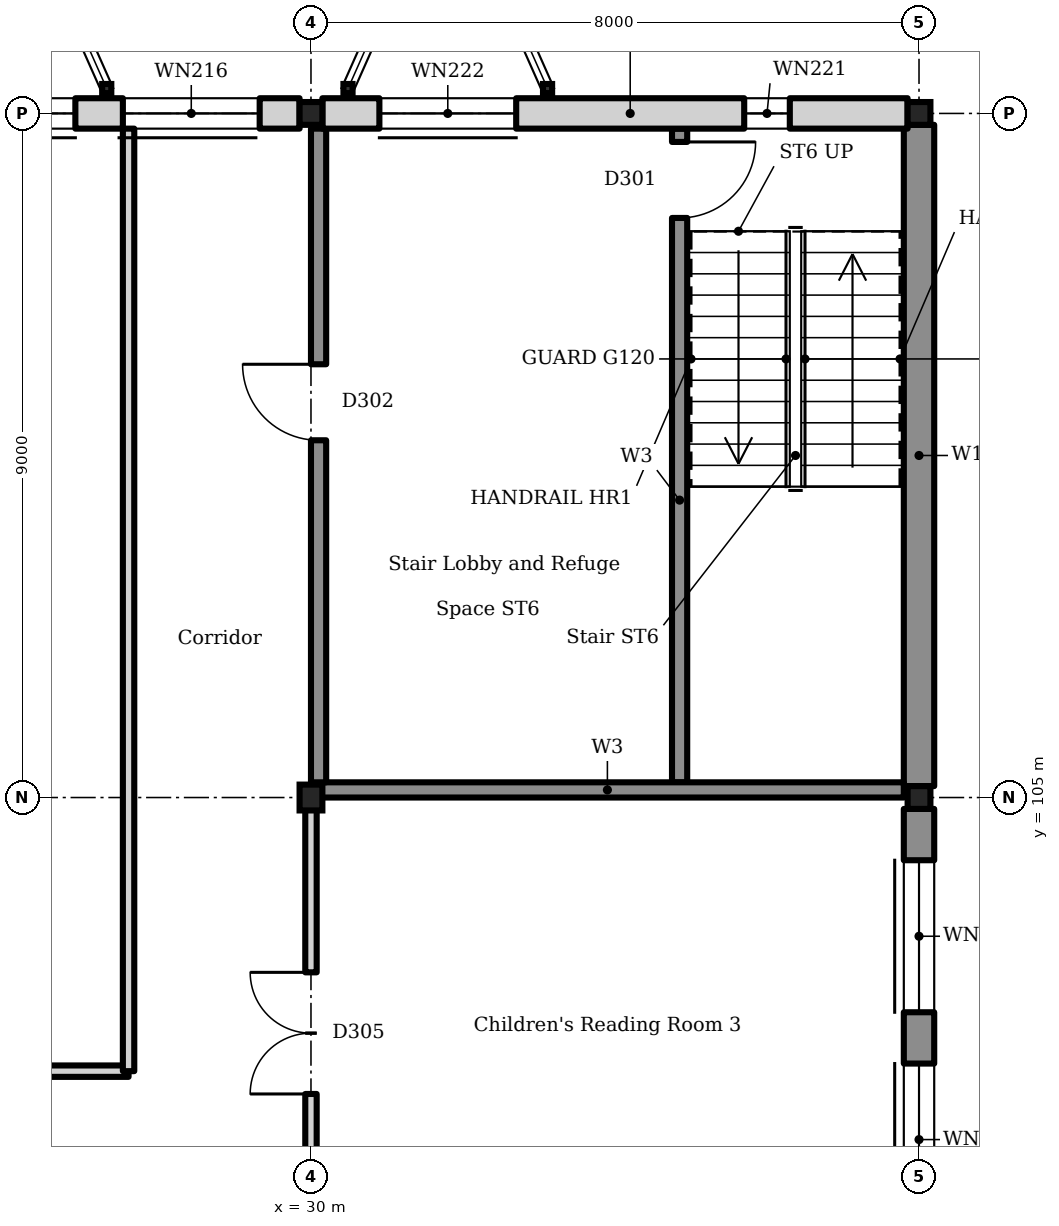
"""IFC4 building model, lengths in metres.
Left out: names, types, materials, properties, quantities, classifications, styles, units other than length and angle.
Written with IfcOpenShell. Run it as: python <this file> out.ifc"""

import sys

from ifc_helpers import new_model, si_unit, direction, frame, frame_2d, origin, origin_2d, place, context, subcontext, project, spatial, rectangle, i_section, extrude, element, fill, save


model = new_model("IFC4")
c1 = context("Model", 3, precision=1e-05, world=origin(), true_north=direction((0.0, 1.0)))
c2 = subcontext(c1, "Body", "Model", "MODEL_VIEW")
j1 = project(units=[si_unit("LENGTHUNIT", "METRE"), si_unit("PLANEANGLEUNIT", "RADIAN")], contexts=[c1])
p1 = place(None, origin())
s1 = spatial("IfcSite", under=j1, at=p1, CompositionType="ELEMENT")
p2 = place(p1, origin())
s2 = spatial("IfcBuilding", under=s1, at=p2, CompositionType="ELEMENT")
p3 = place(p2, frame((0.0, 0.0, 5.4)))
s3 = spatial("IfcBuildingStorey", under=s2, at=p3, CompositionType="ELEMENT", Elevation=5.4)
p4 = place(p3, frame((30.0, 105.0, 0.0), z_axis=(0.0, 0.0, 1.0), x_axis=(1.0, 0.0, 0.0)))
e1 = element("IfcColumn", 1, at=p4, inside=s3, PredefinedType="COLUMN", context=c2, shape_type="SweptSolid", body=[
    extrude(i_section(OverallWidth=0.3, OverallDepth=0.34, WebThickness=0.012, FlangeThickness=0.021, FilletRadius=0.027, at=origin_2d()), origin(), (0.0, 0.0, 1.0), 4.5),
])
for number, where, z_axis, x_axis in (
    (2, (30.0, 114.0, 0.0), (0.0, 0.0, 1.0), (1.0, 0.0, 0.0)),
    (3, (38.0, 105.0, 0.0), (0.0, 0.0, 1.0), (1.0, 0.0, 0.0)),
    (4, (38.0, 114.0, 0.0), (0.0, 0.0, 1.0), (1.0, 0.0, 0.0)),
):
    element("IfcColumn", number, at=place(p3, frame(where, z_axis=z_axis, x_axis=x_axis)), inside=s3, PredefinedType="COLUMN", context=c2, shape_type="SweptSolid", body=[
        extrude(i_section(OverallWidth=0.3, OverallDepth=0.3, WebThickness=0.011, FlangeThickness=0.019, FilletRadius=0.027, at=origin_2d()), origin(), (0.0, 0.0, 1.0), 4.5),
    ])
p5 = place(p3, frame((22.15, 114.0, 0.0), z_axis=(0.0, 0.0, 1.0), x_axis=(1.0, 0.0, 0.0)))
e5 = element("IfcWall", 5, at=p5, inside=s3, PredefinedType="SOLIDWALL", context=c2, shape_type="SweptSolid", body=[
    extrude(rectangle(XDim=7.7, YDim=0.4, at=frame_2d((3.85, 0.0))), origin(), (0.0, 0.0, 1.0), 3.93),
])
p6 = place(p5, frame((0.575, 0.0, 0.45)))
e6 = element("IfcOpeningElement", 6, at=p6, cuts=e5, PredefinedType="OPENING", context=c2, shape_type="SweptSolid", body=[
    extrude(rectangle(XDim=1.8, YDim=3.0, at=frame_2d((0.9, 1.5))), frame((0.0, 0.21, 0.0), z_axis=(0.0, -1.0, 0.0), x_axis=(1.0, 0.0, 0.0)), (0.0, 0.0, 1.0), 0.42),
])
p7 = place(p5, frame((2.95, 0.0, 0.45)))
e7 = element("IfcOpeningElement", 7, at=p7, cuts=e5, PredefinedType="OPENING", context=c2, shape_type="SweptSolid", body=[
    extrude(rectangle(XDim=1.8, YDim=3.0, at=frame_2d((0.9, 1.5))), frame((0.0, 0.21, 0.0), z_axis=(0.0, -1.0, 0.0), x_axis=(1.0, 0.0, 0.0)), (0.0, 0.0, 1.0), 0.42),
])
p8 = place(p5, frame((5.375, 0.0, 0.45)))
e8 = element("IfcOpeningElement", 8, at=p8, cuts=e5, PredefinedType="OPENING", context=c2, shape_type="SweptSolid", body=[
    extrude(rectangle(XDim=1.8, YDim=3.0, at=frame_2d((0.9, 1.5))), frame((0.0, 0.21, 0.0), z_axis=(0.0, -1.0, 0.0), x_axis=(1.0, 0.0, 0.0)), (0.0, 0.0, 1.0), 0.42),
])
p9 = place(p3, frame((30.15, 114.0, 0.0), z_axis=(0.0, 0.0, 1.0), x_axis=(1.0, 0.0, 0.0)))
e9 = element("IfcWall", 9, at=p9, inside=s3, PredefinedType="SOLIDWALL", context=c2, shape_type="SweptSolid", body=[
    extrude(rectangle(XDim=7.7, YDim=0.4, at=frame_2d((3.85, 0.0))), origin(), (0.0, 0.0, 1.0), 3.93),
])
p10 = place(p9, frame((5.55, 0.0, 1.0)))
e10 = element("IfcOpeningElement", 10, at=p10, cuts=e9, PredefinedType="OPENING", context=c2, shape_type="SweptSolid", body=[
    extrude(rectangle(XDim=0.6, YDim=2.4, at=frame_2d((0.3, 1.2))), frame((0.0, 0.21, 0.0), z_axis=(0.0, -1.0, 0.0), x_axis=(1.0, 0.0, 0.0)), (0.0, 0.0, 1.0), 0.42),
])
p11 = place(p9, frame((0.75, 0.0, 0.45)))
e11 = element("IfcOpeningElement", 11, at=p11, cuts=e9, PredefinedType="OPENING", context=c2, shape_type="SweptSolid", body=[
    extrude(rectangle(XDim=1.8, YDim=3.0, at=frame_2d((0.9, 1.5))), frame((0.0, 0.21, 0.0), z_axis=(0.0, -1.0, 0.0), x_axis=(1.0, 0.0, 0.0)), (0.0, 0.0, 1.0), 0.42),
])
p12 = place(p3, frame((38.0, 96.15, 0.0), z_axis=(0.0, 0.0, 1.0), x_axis=(0.0, 1.0, 0.0)))
e12 = element("IfcWall", 12, at=p12, inside=s3, PredefinedType="SOLIDWALL", context=c2, shape_type="SweptSolid", body=[
    extrude(rectangle(XDim=8.7, YDim=0.4, at=frame_2d((4.35, 0.0))), origin(), (0.0, 0.0, 1.0), 4.5),
])
p13 = place(p12, frame((0.675, 0.0, 0.45)))
e13 = element("IfcOpeningElement", 13, at=p13, cuts=e12, PredefinedType="OPENING", context=c2, shape_type="SweptSolid", body=[
    extrude(rectangle(XDim=2.0, YDim=3.0, at=frame_2d((1.0, 1.5))), frame((0.0, 0.21, 0.0), z_axis=(0.0, -1.0, 0.0), x_axis=(1.0, 0.0, 0.0)), (0.0, 0.0, 1.0), 0.42),
])
p14 = place(p12, frame((3.35, 0.0, 0.45)))
e14 = element("IfcOpeningElement", 14, at=p14, cuts=e12, PredefinedType="OPENING", context=c2, shape_type="SweptSolid", body=[
    extrude(rectangle(XDim=2.0, YDim=3.0, at=frame_2d((1.0, 1.5))), frame((0.0, 0.21, 0.0), z_axis=(0.0, -1.0, 0.0), x_axis=(1.0, 0.0, 0.0)), (0.0, 0.0, 1.0), 0.42),
])
p15 = place(p12, frame((6.025, 0.0, 0.45)))
e15 = element("IfcOpeningElement", 15, at=p15, cuts=e12, PredefinedType="OPENING", context=c2, shape_type="SweptSolid", body=[
    extrude(rectangle(XDim=2.0, YDim=3.0, at=frame_2d((1.0, 1.5))), frame((0.0, 0.21, 0.0), z_axis=(0.0, -1.0, 0.0), x_axis=(1.0, 0.0, 0.0)), (0.0, 0.0, 1.0), 0.42),
])
p16 = place(p3, frame((38.0, 105.15, 0.0), z_axis=(0.0, 0.0, 1.0), x_axis=(0.0, 1.0, 0.0)))
e16 = element("IfcWall", 16, at=p16, inside=s3, PredefinedType="SOLIDWALL", context=c2, shape_type="SweptSolid", body=[
    extrude(rectangle(XDim=8.7, YDim=0.4, at=frame_2d((4.35, 0.0))), origin(), (0.0, 0.0, 1.0), 4.5),
])
p17 = place(p3, frame((34.85, 105.2, 0.0), z_axis=(0.0, 0.0, 1.0), x_axis=(0.0, 1.0, 0.0)))
e17 = element("IfcWall", 17, at=p17, inside=s3, PredefinedType="SOLIDWALL", context=c2, shape_type="SweptSolid", body=[
    extrude(rectangle(XDim=8.6, YDim=0.2, at=frame_2d((4.3, 0.0))), origin(), (0.0, 0.0, 1.0), 4.35),
])
p18 = place(p17, frame((7.425, 0.0, 0.0)))
e18 = element("IfcOpeningElement", 18, at=p18, cuts=e17, PredefinedType="OPENING", context=c2, shape_type="SweptSolid", body=[
    extrude(rectangle(XDim=1.0, YDim=2.1, at=frame_2d((0.5, 1.05))), frame((0.0, 0.11, 0.0), z_axis=(0.0, -1.0, 0.0), x_axis=(1.0, 0.0, 0.0)), (0.0, 0.0, 1.0), 0.22),
])
p19 = place(p3, frame((30.0, 105.1, 0.0), z_axis=(0.0, 0.0, 1.0), x_axis=(1.0, 0.0, 0.0)))
e19 = element("IfcWall", 19, at=p19, inside=s3, PredefinedType="SOLIDWALL", context=c2, shape_type="SweptSolid", body=[
    extrude(rectangle(XDim=7.8, YDim=0.2, at=frame_2d((3.9, 0.0))), origin(), (0.0, 0.0, 1.0), 4.35),
])
p20 = place(p3, frame((30.1, 105.2, 0.0), z_axis=(0.0, 0.0, 1.0), x_axis=(0.0, 1.0, 0.0)))
e20 = element("IfcWall", 20, at=p20, inside=s3, PredefinedType="SOLIDWALL", context=c2, shape_type="SweptSolid", body=[
    extrude(rectangle(XDim=8.6, YDim=0.2, at=frame_2d((4.3, 0.0))), origin(), (0.0, 0.0, 1.0), 3.91),
])
p21 = place(p20, frame((4.5, 0.0, 0.0)))
e21 = element("IfcOpeningElement", 21, at=p21, cuts=e20, PredefinedType="OPENING", context=c2, shape_type="SweptSolid", body=[
    extrude(rectangle(XDim=1.0, YDim=2.1, at=frame_2d((0.5, 1.05))), frame((0.0, 0.11, 0.0), z_axis=(0.0, -1.0, 0.0), x_axis=(1.0, 0.0, 0.0)), (0.0, 0.0, 1.0), 0.22),
])
p22 = place(p3, frame((10.4, 101.4, 0.0), z_axis=(0.0, 0.0, 1.0), x_axis=(1.0, 0.0, 0.0)))
e22 = element("IfcWall", 22, at=p22, inside=s3, PredefinedType="PARTITIONING", context=c2, shape_type="SweptSolid", body=[
    extrude(rectangle(XDim=17.2, YDim=0.15, at=frame_2d((8.6, 0.0))), origin(), (0.0, 0.0, 1.0), 3.91),
])
p23 = place(p22, frame((8.11, 0.0, 0.0)))
e23 = element("IfcOpeningElement", 23, at=p23, cuts=e22, PredefinedType="OPENING", context=c2, shape_type="SweptSolid", body=[
    extrude(rectangle(XDim=1.0, YDim=2.1, at=frame_2d((0.5, 1.05))), frame((0.0, 0.085, 0.0), z_axis=(0.0, -1.0, 0.0), x_axis=(1.0, 0.0, 0.0)), (0.0, 0.0, 1.0), 0.17),
])
p24 = place(p3, frame((27.6, 101.4, 0.0), z_axis=(0.0, 0.0, 1.0), x_axis=(0.0, 1.0, 0.0)))
e24 = element("IfcWall", 24, at=p24, inside=s3, PredefinedType="PARTITIONING", context=c2, shape_type="SweptSolid", body=[
    extrude(rectangle(XDim=12.4, YDim=0.15, at=frame_2d((6.2, 0.0))), origin(), (0.0, 0.0, 1.0), 3.96),
])
p25 = place(p3, frame((30.0, 99.0, 0.0), z_axis=(0.0, 0.0, 1.0), x_axis=(0.0, 1.0, 0.0)))
e25 = element("IfcWall", 25, at=p25, inside=s3, PredefinedType="PARTITIONING", context=c2, shape_type="SweptSolid", body=[
    extrude(rectangle(XDim=5.85, YDim=0.15, at=frame_2d((2.925, 0.0))), origin(), (0.0, 0.0, 1.0), 3.91),
])
p26 = place(p25, frame((2.1, 0.0, 0.0)))
e26 = element("IfcOpeningElement", 26, at=p26, cuts=e25, PredefinedType="OPENING", context=c2, shape_type="SweptSolid", body=[
    extrude(rectangle(XDim=1.6, YDim=2.1, at=frame_2d((0.8, 1.05))), frame((0.0, 0.085, 0.0), z_axis=(0.0, -1.0, 0.0), x_axis=(1.0, 0.0, 0.0)), (0.0, 0.0, 1.0), 0.17),
])
p27 = place(p7, origin())
e27 = element("IfcWindow", 27, at=p27, inside=s3, PartitioningType="SINGLE_PANEL", PredefinedType="WINDOW", context=c2, shape_type="SweptSolid", body=[
    extrude(rectangle(XDim=1.8, YDim=3.0, at=frame_2d((0.9, 1.5))), frame((0.0, 0.03, 0.0), z_axis=(0.0, -1.0, 0.0), x_axis=(1.0, 0.0, 0.0)), (0.0, 0.0, 1.0), 0.06),
])
fill(e7, e27)
p28 = place(p8, origin())
e28 = element("IfcWindow", 28, at=p28, inside=s3, PartitioningType="SINGLE_PANEL", PredefinedType="WINDOW", context=c2, shape_type="SweptSolid", body=[
    extrude(rectangle(XDim=1.8, YDim=3.0, at=frame_2d((0.9, 1.5))), frame((0.0, 0.03, 0.0), z_axis=(0.0, -1.0, 0.0), x_axis=(1.0, 0.0, 0.0)), (0.0, 0.0, 1.0), 0.06),
])
fill(e8, e28)
p29 = place(p10, origin())
e29 = element("IfcWindow", 29, at=p29, inside=s3, PartitioningType="SINGLE_PANEL", PredefinedType="WINDOW", context=c2, shape_type="SweptSolid", body=[
    extrude(rectangle(XDim=0.6, YDim=2.4, at=frame_2d((0.3, 1.2))), frame((0.0, 0.03, 0.0), z_axis=(0.0, -1.0, 0.0), x_axis=(1.0, 0.0, 0.0)), (0.0, 0.0, 1.0), 0.06),
])
fill(e10, e29)
p30 = place(p11, origin())
e30 = element("IfcWindow", 30, at=p30, inside=s3, PartitioningType="SINGLE_PANEL", PredefinedType="WINDOW", context=c2, shape_type="SweptSolid", body=[
    extrude(rectangle(XDim=1.8, YDim=3.0, at=frame_2d((0.9, 1.5))), frame((0.0, 0.03, 0.0), z_axis=(0.0, -1.0, 0.0), x_axis=(1.0, 0.0, 0.0)), (0.0, 0.0, 1.0), 0.06),
])
fill(e11, e30)
p31 = place(p14, origin())
e31 = element("IfcWindow", 31, at=p31, inside=s3, PartitioningType="SINGLE_PANEL", PredefinedType="WINDOW", context=c2, shape_type="SweptSolid", body=[
    extrude(rectangle(XDim=2.0, YDim=3.0, at=frame_2d((1.0, 1.5))), frame((0.0, 0.03, 0.0), z_axis=(0.0, -1.0, 0.0), x_axis=(1.0, 0.0, 0.0)), (0.0, 0.0, 1.0), 0.06),
])
fill(e14, e31)
p32 = place(p15, origin())
e32 = element("IfcWindow", 32, at=p32, inside=s3, PartitioningType="SINGLE_PANEL", PredefinedType="WINDOW", context=c2, shape_type="SweptSolid", body=[
    extrude(rectangle(XDim=2.0, YDim=3.0, at=frame_2d((1.0, 1.5))), frame((0.0, 0.03, 0.0), z_axis=(0.0, -1.0, 0.0), x_axis=(1.0, 0.0, 0.0)), (0.0, 0.0, 1.0), 0.06),
])
fill(e15, e32)
p33 = place(p18, frame((1.0, 0.0, 0.0), z_axis=(0.0, 0.0, 1.0), x_axis=(-1.0, 0.0, 0.0)))
e33 = element("IfcDoor", 33, at=p33, inside=s3, OperationType="SINGLE_SWING_RIGHT", PredefinedType="DOOR", context=c2, shape_type="SweptSolid", body=[
    extrude(rectangle(XDim=1.0, YDim=2.1, at=frame_2d((0.5, 1.05))), frame((0.0, 0.025, 0.0), z_axis=(0.0, -1.0, 0.0), x_axis=(1.0, 0.0, 0.0)), (0.0, 0.0, 1.0), 0.05),
])
fill(e18, e33)
p34 = place(p21, origin())
e34 = element("IfcDoor", 34, at=p34, inside=s3, OperationType="SINGLE_SWING_LEFT", PredefinedType="DOOR", context=c2, shape_type="SweptSolid", body=[
    extrude(rectangle(XDim=1.0, YDim=2.1, at=frame_2d((0.5, 1.05))), frame((0.0, 0.025, 0.0), z_axis=(0.0, -1.0, 0.0), x_axis=(1.0, 0.0, 0.0)), (0.0, 0.0, 1.0), 0.05),
])
fill(e21, e34)
p35 = place(p26, origin())
e35 = element("IfcDoor", 35, at=p35, inside=s3, OperationType="DOUBLE_DOOR_SINGLE_SWING", PredefinedType="DOOR", context=c2, shape_type="SweptSolid", body=[
    extrude(rectangle(XDim=1.6, YDim=2.1, at=frame_2d((0.8, 1.05))), frame((0.0, 0.025, 0.0), z_axis=(0.0, -1.0, 0.0), x_axis=(1.0, 0.0, 0.0)), (0.0, 0.0, 1.0), 0.05),
])
fill(e26, e35)
save(model, sys.argv[1])
